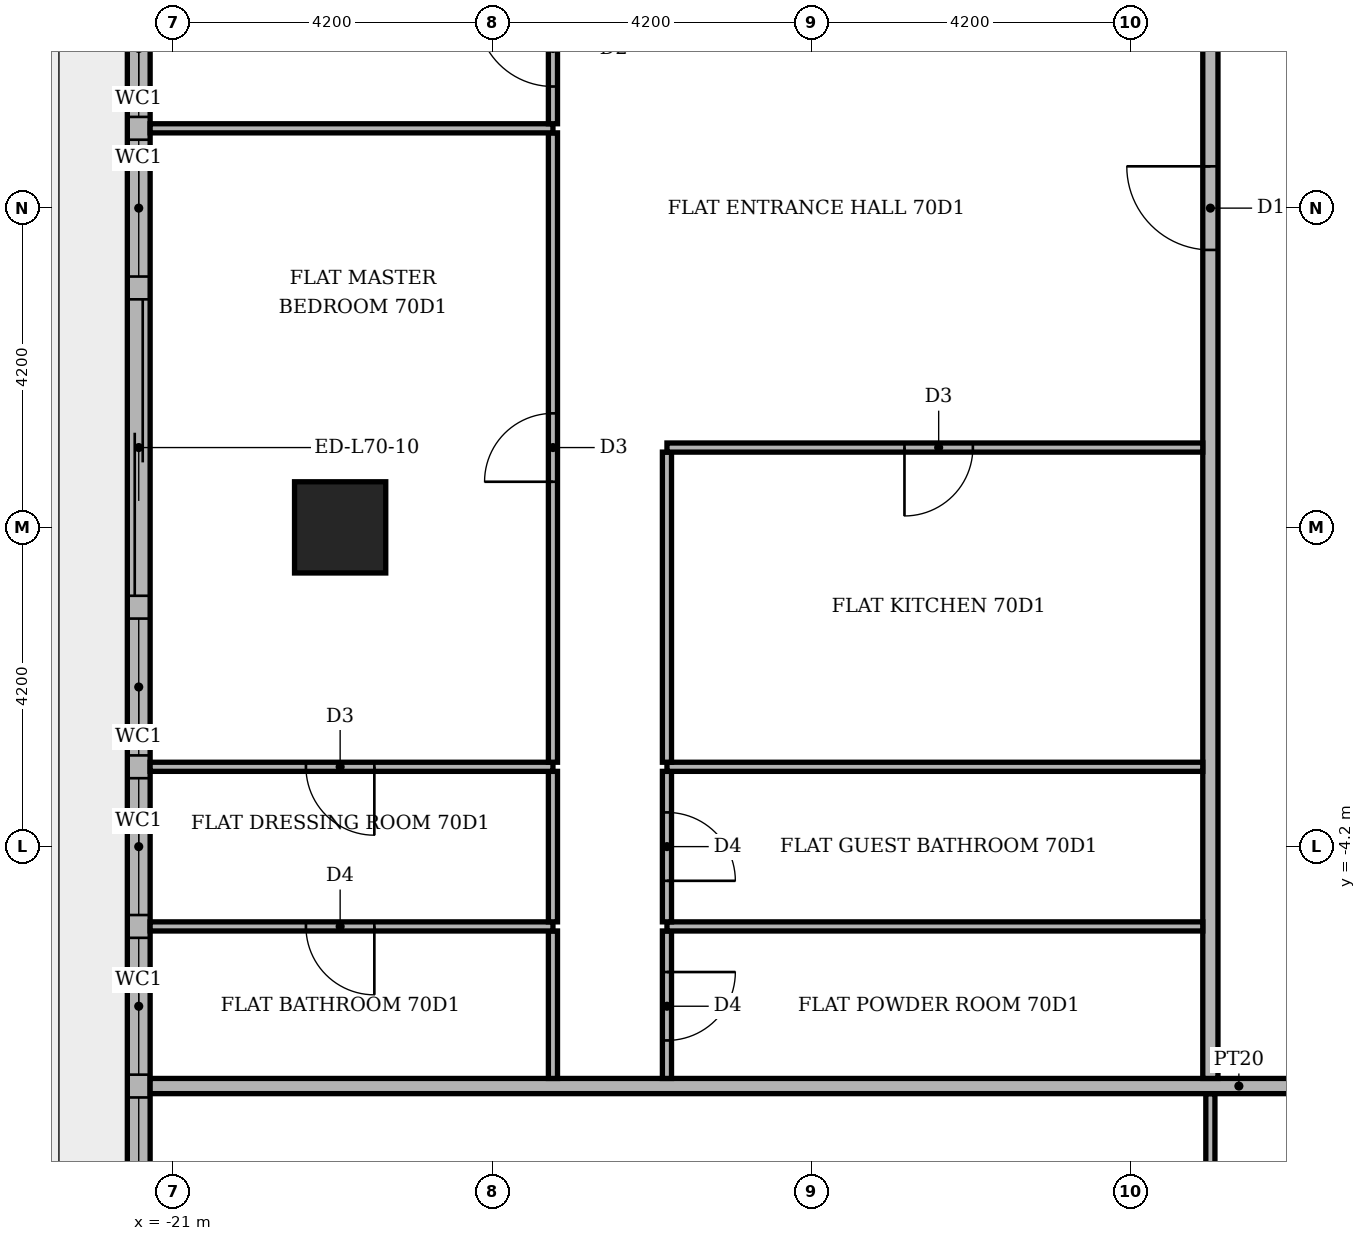
"""IFC4 building model, lengths in metres.
Left out: names, types, materials, properties, quantities, classifications, styles, units other than length and angle.
Written with IfcOpenShell. Run it as: python <this file> out.ifc"""

import sys

from ifc_helpers import new_model, si_unit, direction, frame, frame_2d, origin, origin_2d, place, context, subcontext, project, spatial, rectangle, extrude, element, fill, save


model = new_model("IFC4")
c1 = context("Model", 3, precision=1e-05, world=origin(), true_north=direction((0.0, 1.0)))
c2 = subcontext(c1, "Body", "Model", "MODEL_VIEW")
j1 = project(units=[si_unit("LENGTHUNIT", "METRE"), si_unit("PLANEANGLEUNIT", "RADIAN")], contexts=[c1])
p1 = place(None, origin())
s1 = spatial("IfcSite", under=j1, at=p1, CompositionType="ELEMENT")
p2 = place(p1, origin())
s2 = spatial("IfcBuilding", under=s1, at=p2, CompositionType="ELEMENT")
p3 = place(p2, frame((0.0, 0.0, 292.8)))
s3 = spatial("IfcBuildingStorey", under=s2, at=p3, CompositionType="ELEMENT", Elevation=292.8)
p4 = place(p3, frame((-18.8, 0.0, -0.35), z_axis=(0.0, 0.0, 1.0), x_axis=(1.0, 0.0, 0.0)))
e1 = element("IfcColumn", 1, at=p4, inside=s3, PredefinedType="COLUMN", context=c2, shape_type="SweptSolid", body=[
    extrude(rectangle(XDim=1.2, YDim=1.2, at=origin_2d()), origin(), (0.0, 0.0, 1.0), 4.25),
])
p5 = place(p3, frame((-21.45, 15.8, 0.0), z_axis=(0.0, 0.0, 1.0), x_axis=(0.0, -1.0, 0.0)))
e2 = element("IfcWall", 2, at=p5, inside=s3, PredefinedType="STANDARD", context=c2, shape_type="SweptSolid", body=[
    extrude(rectangle(XDim=31.9, YDim=0.3, at=frame_2d((15.95, 0.0))), origin(), (0.0, 0.0, 1.0), 3.55),
])
p6 = place(p5, frame((0.2, 0.0, 0.6)))
e3 = element("IfcOpeningElement", 3, at=p6, cuts=e2, PredefinedType="OPENING", context=c2, shape_type="SweptSolid", body=[
    extrude(rectangle(XDim=3.9, YDim=2.4, at=frame_2d((1.95, 1.2))), frame((0.0, 0.16, 0.0), z_axis=(0.0, -1.0, 0.0), x_axis=(1.0, 0.0, 0.0)), (0.0, 0.0, 1.0), 0.32),
])
p7 = place(p5, frame((4.4, 0.0, 0.0)))
e4 = element("IfcOpeningElement", 4, at=p7, cuts=e2, PredefinedType="OPENING", context=c2, shape_type="SweptSolid", body=[
    extrude(rectangle(XDim=3.9, YDim=2.4, at=frame_2d((1.95, 1.2))), frame((0.0, 0.16, 0.0), z_axis=(0.0, -1.0, 0.0), x_axis=(1.0, 0.0, 0.0)), (0.0, 0.0, 1.0), 0.32),
])
p8 = place(p5, frame((8.6, 0.0, 0.6)))
e5 = element("IfcOpeningElement", 5, at=p8, cuts=e2, PredefinedType="OPENING", context=c2, shape_type="SweptSolid", body=[
    extrude(rectangle(XDim=1.8, YDim=2.4, at=frame_2d((0.9, 1.2))), frame((0.0, 0.16, 0.0), z_axis=(0.0, -1.0, 0.0), x_axis=(1.0, 0.0, 0.0)), (0.0, 0.0, 1.0), 0.32),
])
p9 = place(p5, frame((10.7, 0.0, 0.6)))
e6 = element("IfcOpeningElement", 6, at=p9, cuts=e2, PredefinedType="OPENING", context=c2, shape_type="SweptSolid", body=[
    extrude(rectangle(XDim=1.8, YDim=2.4, at=frame_2d((0.9, 1.2))), frame((0.0, 0.16, 0.0), z_axis=(0.0, -1.0, 0.0), x_axis=(1.0, 0.0, 0.0)), (0.0, 0.0, 1.0), 0.32),
])
p10 = place(p5, frame((12.8, 0.0, 0.0)))
e7 = element("IfcOpeningElement", 7, at=p10, cuts=e2, PredefinedType="OPENING", context=c2, shape_type="SweptSolid", body=[
    extrude(rectangle(XDim=3.9, YDim=2.4, at=frame_2d((1.95, 1.2))), frame((0.0, 0.16, 0.0), z_axis=(0.0, -1.0, 0.0), x_axis=(1.0, 0.0, 0.0)), (0.0, 0.0, 1.0), 0.32),
])
p11 = place(p5, frame((17.0, 0.0, 0.6)))
e8 = element("IfcOpeningElement", 8, at=p11, cuts=e2, PredefinedType="OPENING", context=c2, shape_type="SweptSolid", body=[
    extrude(rectangle(XDim=1.8, YDim=2.4, at=frame_2d((0.9, 1.2))), frame((0.0, 0.16, 0.0), z_axis=(0.0, -1.0, 0.0), x_axis=(1.0, 0.0, 0.0)), (0.0, 0.0, 1.0), 0.32),
])
p12 = place(p5, frame((19.1, 0.0, 0.6)))
e9 = element("IfcOpeningElement", 9, at=p12, cuts=e2, PredefinedType="OPENING", context=c2, shape_type="SweptSolid", body=[
    extrude(rectangle(XDim=1.8, YDim=2.4, at=frame_2d((0.9, 1.2))), frame((0.0, 0.16, 0.0), z_axis=(0.0, -1.0, 0.0), x_axis=(1.0, 0.0, 0.0)), (0.0, 0.0, 1.0), 0.32),
])
p13 = place(p5, frame((21.2, 0.0, 0.6)))
e10 = element("IfcOpeningElement", 10, at=p13, cuts=e2, PredefinedType="OPENING", context=c2, shape_type="SweptSolid", body=[
    extrude(rectangle(XDim=1.8, YDim=2.4, at=frame_2d((0.9, 1.2))), frame((0.0, 0.16, 0.0), z_axis=(0.0, -1.0, 0.0), x_axis=(1.0, 0.0, 0.0)), (0.0, 0.0, 1.0), 0.32),
])
p14 = place(p5, frame((23.3, 0.0, 0.6)))
e11 = element("IfcOpeningElement", 11, at=p14, cuts=e2, PredefinedType="OPENING", context=c2, shape_type="SweptSolid", body=[
    extrude(rectangle(XDim=6.0, YDim=2.4, at=frame_2d((3.0, 1.2))), frame((0.0, 0.16, 0.0), z_axis=(0.0, -1.0, 0.0), x_axis=(1.0, 0.0, 0.0)), (0.0, 0.0, 1.0), 0.32),
])
p15 = place(p5, frame((29.6, 0.0, 0.6)))
e12 = element("IfcOpeningElement", 12, at=p15, cuts=e2, PredefinedType="OPENING", context=c2, shape_type="SweptSolid", body=[
    extrude(rectangle(XDim=1.8, YDim=2.4, at=frame_2d((0.9, 1.2))), frame((0.0, 0.16, 0.0), z_axis=(0.0, -1.0, 0.0), x_axis=(1.0, 0.0, 0.0)), (0.0, 0.0, 1.0), 0.32),
])
p16 = place(p3, frame((-7.35, -16.24, 0.0), z_axis=(0.0, 0.0, 1.0), x_axis=(0.0, 1.0, 0.0)))
e13 = element("IfcWall", 13, at=p16, inside=s3, PredefinedType="PARTITIONING", context=c2, shape_type="SweptSolid", body=[
    extrude(rectangle(XDim=8.79, YDim=0.12, at=frame_2d((4.395, 0.0))), origin(), (0.0, 0.0, 1.0), 3.55),
])
p17 = place(p16, frame((3.965, 0.0, 0.0)))
e14 = element("IfcOpeningElement", 14, at=p17, cuts=e13, PredefinedType="OPENING", context=c2, shape_type="SweptSolid", body=[
    extrude(rectangle(XDim=0.9, YDim=2.1, at=frame_2d((0.45, 1.05))), frame((0.0, 0.07, 0.0), z_axis=(0.0, -1.0, 0.0), x_axis=(1.0, 0.0, 0.0)), (0.0, 0.0, 1.0), 0.14),
])
p18 = place(p3, frame((-21.3, -7.35, 0.0), z_axis=(0.0, 0.0, 1.0), x_axis=(1.0, 0.0, 0.0)))
e15 = element("IfcWall", 15, at=p18, inside=s3, PredefinedType="PARTITIONING", context=c2, shape_type="SweptSolid", body=[
    extrude(rectangle(XDim=28.65, YDim=0.2, at=frame_2d((14.325, 0.0))), origin(), (0.0, 0.0, 1.0), 3.55),
])
p19 = place(p18, frame((16.55, 0.0, 0.0)))
e16 = element("IfcOpeningElement", 16, at=p19, cuts=e15, PredefinedType="OPENING", context=c2, shape_type="SweptSolid", body=[
    extrude(rectangle(XDim=1.1, YDim=2.4, at=frame_2d((0.55, 1.2))), frame((0.0, 0.11, 0.0), z_axis=(0.0, -1.0, 0.0), x_axis=(1.0, 0.0, 0.0)), (0.0, 0.0, 1.0), 0.22),
])
p20 = place(p3, frame((-16.0, -7.25, 0.0), z_axis=(0.0, 0.0, 1.0), x_axis=(0.0, 1.0, 0.0)))
e17 = element("IfcWall", 17, at=p20, inside=s3, PredefinedType="PARTITIONING", context=c2, shape_type="SweptSolid", body=[
    extrude(rectangle(XDim=1.94, YDim=0.12, at=frame_2d((0.97, 0.0))), origin(), (0.0, 0.0, 1.0), 3.55),
])
p21 = place(p3, frame((-14.5, -7.25, 0.0), z_axis=(0.0, 0.0, 1.0), x_axis=(0.0, 1.0, 0.0)))
e18 = element("IfcWall", 18, at=p21, inside=s3, PredefinedType="PARTITIONING", context=c2, shape_type="SweptSolid", body=[
    extrude(rectangle(XDim=1.94, YDim=0.12, at=frame_2d((0.97, 0.0))), origin(), (0.0, 0.0, 1.0), 3.55),
])
p22 = place(p21, frame((0.5, 0.0, 0.0)))
e19 = element("IfcOpeningElement", 19, at=p22, cuts=e18, PredefinedType="OPENING", context=c2, shape_type="SweptSolid", body=[
    extrude(rectangle(XDim=0.9, YDim=2.1, at=frame_2d((0.45, 1.05))), frame((0.0, 0.07, 0.0), z_axis=(0.0, -1.0, 0.0), x_axis=(1.0, 0.0, 0.0)), (0.0, 0.0, 1.0), 0.14),
])
p23 = place(p3, frame((-7.35, -7.25, 0.0), z_axis=(0.0, 0.0, 1.0), x_axis=(0.0, 1.0, 0.0)))
e20 = element("IfcWall", 20, at=p23, inside=s3, PredefinedType="PARTITIONING", context=c2, shape_type="SweptSolid", body=[
    extrude(rectangle(XDim=14.5, YDim=0.2, at=frame_2d((7.25, 0.0))), origin(), (0.0, 0.0, 1.0), 3.55),
])
p24 = place(p23, frame((10.9, 0.0, 0.0)))
e21 = element("IfcOpeningElement", 21, at=p24, cuts=e20, PredefinedType="OPENING", context=c2, shape_type="SweptSolid", body=[
    extrude(rectangle(XDim=1.1, YDim=2.4, at=frame_2d((0.55, 1.2))), frame((0.0, 0.11, 0.0), z_axis=(0.0, -1.0, 0.0), x_axis=(1.0, 0.0, 0.0)), (0.0, 0.0, 1.0), 0.22),
])
p25 = place(p3, frame((-21.3, -5.25, 0.0), z_axis=(0.0, 0.0, 1.0), x_axis=(1.0, 0.0, 0.0)))
e22 = element("IfcWall", 22, at=p25, inside=s3, PredefinedType="PARTITIONING", context=c2, shape_type="SweptSolid", body=[
    extrude(rectangle(XDim=5.3, YDim=0.12, at=frame_2d((2.65, 0.0))), origin(), (0.0, 0.0, 1.0), 3.55),
])
p26 = place(p25, frame((2.05, 0.0, 0.0)))
e23 = element("IfcOpeningElement", 23, at=p26, cuts=e22, PredefinedType="OPENING", context=c2, shape_type="SweptSolid", body=[
    extrude(rectangle(XDim=0.9, YDim=2.1, at=frame_2d((0.45, 1.05))), frame((0.0, 0.07, 0.0), z_axis=(0.0, -1.0, 0.0), x_axis=(1.0, 0.0, 0.0)), (0.0, 0.0, 1.0), 0.14),
])
p27 = place(p3, frame((-14.5, -5.25, 0.0), z_axis=(0.0, 0.0, 1.0), x_axis=(1.0, 0.0, 0.0)))
e24 = element("IfcWall", 24, at=p27, inside=s3, PredefinedType="PARTITIONING", context=c2, shape_type="SweptSolid", body=[
    extrude(rectangle(XDim=7.05, YDim=0.12, at=frame_2d((3.525, 0.0))), origin(), (0.0, 0.0, 1.0), 3.55),
])
p28 = place(p3, frame((-16.0, -5.19, 0.0), z_axis=(0.0, 0.0, 1.0), x_axis=(0.0, 1.0, 0.0)))
e25 = element("IfcWall", 25, at=p28, inside=s3, PredefinedType="PARTITIONING", context=c2, shape_type="SweptSolid", body=[
    extrude(rectangle(XDim=1.98, YDim=0.12, at=frame_2d((0.99, 0.0))), origin(), (0.0, 0.0, 1.0), 3.55),
])
p29 = place(p3, frame((-14.5, -5.19, 0.0), z_axis=(0.0, 0.0, 1.0), x_axis=(0.0, 1.0, 0.0)))
e26 = element("IfcWall", 26, at=p29, inside=s3, PredefinedType="PARTITIONING", context=c2, shape_type="SweptSolid", body=[
    extrude(rectangle(XDim=1.98, YDim=0.12, at=frame_2d((0.99, 0.0))), origin(), (0.0, 0.0, 1.0), 3.55),
])
p30 = place(p29, frame((0.54, 0.0, 0.0)))
e27 = element("IfcOpeningElement", 27, at=p30, cuts=e26, PredefinedType="OPENING", context=c2, shape_type="SweptSolid", body=[
    extrude(rectangle(XDim=0.9, YDim=2.1, at=frame_2d((0.45, 1.05))), frame((0.0, 0.07, 0.0), z_axis=(0.0, -1.0, 0.0), x_axis=(1.0, 0.0, 0.0)), (0.0, 0.0, 1.0), 0.14),
])
p31 = place(p3, frame((-21.3, -3.15, 0.0), z_axis=(0.0, 0.0, 1.0), x_axis=(1.0, 0.0, 0.0)))
e28 = element("IfcWall", 28, at=p31, inside=s3, PredefinedType="PARTITIONING", context=c2, shape_type="SweptSolid", body=[
    extrude(rectangle(XDim=5.3, YDim=0.12, at=frame_2d((2.65, 0.0))), origin(), (0.0, 0.0, 1.0), 3.55),
])
p32 = place(p31, frame((2.05, 0.0, 0.0)))
e29 = element("IfcOpeningElement", 29, at=p32, cuts=e28, PredefinedType="OPENING", context=c2, shape_type="SweptSolid", body=[
    extrude(rectangle(XDim=0.9, YDim=2.1, at=frame_2d((0.45, 1.05))), frame((0.0, 0.07, 0.0), z_axis=(0.0, -1.0, 0.0), x_axis=(1.0, 0.0, 0.0)), (0.0, 0.0, 1.0), 0.14),
])
p33 = place(p3, frame((-14.5, -3.15, 0.0), z_axis=(0.0, 0.0, 1.0), x_axis=(1.0, 0.0, 0.0)))
e30 = element("IfcWall", 30, at=p33, inside=s3, PredefinedType="PARTITIONING", context=c2, shape_type="SweptSolid", body=[
    extrude(rectangle(XDim=7.05, YDim=0.12, at=frame_2d((3.525, 0.0))), origin(), (0.0, 0.0, 1.0), 3.55),
])
p34 = place(p3, frame((-16.0, -3.09, 0.0), z_axis=(0.0, 0.0, 1.0), x_axis=(0.0, 1.0, 0.0)))
e31 = element("IfcWall", 31, at=p34, inside=s3, PredefinedType="PARTITIONING", context=c2, shape_type="SweptSolid", body=[
    extrude(rectangle(XDim=8.28, YDim=0.12, at=frame_2d((4.14, 0.0))), origin(), (0.0, 0.0, 1.0), 3.55),
])
p35 = place(p34, frame((3.69, 0.0, 0.0)))
e32 = element("IfcOpeningElement", 32, at=p35, cuts=e31, PredefinedType="OPENING", context=c2, shape_type="SweptSolid", body=[
    extrude(rectangle(XDim=0.9, YDim=2.1, at=frame_2d((0.45, 1.05))), frame((0.0, 0.07, 0.0), z_axis=(0.0, -1.0, 0.0), x_axis=(1.0, 0.0, 0.0)), (0.0, 0.0, 1.0), 0.14),
])
p36 = place(p3, frame((-14.5, -3.09, 0.0), z_axis=(0.0, 0.0, 1.0), x_axis=(0.0, 1.0, 0.0)))
e33 = element("IfcWall", 33, at=p36, inside=s3, PredefinedType="PARTITIONING", context=c2, shape_type="SweptSolid", body=[
    extrude(rectangle(XDim=4.08, YDim=0.12, at=frame_2d((2.04, 0.0))), origin(), (0.0, 0.0, 1.0), 3.55),
])
p37 = place(p3, frame((-14.5, 1.05, 0.0), z_axis=(0.0, 0.0, 1.0), x_axis=(1.0, 0.0, 0.0)))
e34 = element("IfcWall", 34, at=p37, inside=s3, PredefinedType="PARTITIONING", context=c2, shape_type="SweptSolid", body=[
    extrude(rectangle(XDim=7.05, YDim=0.12, at=frame_2d((3.525, 0.0))), origin(), (0.0, 0.0, 1.0), 3.55),
])
p38 = place(p37, frame((3.125, 0.0, 0.0)))
e35 = element("IfcOpeningElement", 35, at=p38, cuts=e34, PredefinedType="OPENING", context=c2, shape_type="SweptSolid", body=[
    extrude(rectangle(XDim=0.9, YDim=2.1, at=frame_2d((0.45, 1.05))), frame((0.0, 0.07, 0.0), z_axis=(0.0, -1.0, 0.0), x_axis=(1.0, 0.0, 0.0)), (0.0, 0.0, 1.0), 0.14),
])
p39 = place(p3, frame((-21.3, 5.25, 0.0), z_axis=(0.0, 0.0, 1.0), x_axis=(1.0, 0.0, 0.0)))
e36 = element("IfcWall", 36, at=p39, inside=s3, PredefinedType="PARTITIONING", context=c2, shape_type="SweptSolid", body=[
    extrude(rectangle(XDim=5.3, YDim=0.12, at=frame_2d((2.65, 0.0))), origin(), (0.0, 0.0, 1.0), 3.55),
])
p40 = place(p3, frame((-16.0, 5.31, 0.0), z_axis=(0.0, 0.0, 1.0), x_axis=(0.0, 1.0, 0.0)))
e37 = element("IfcWall", 37, at=p40, inside=s3, PredefinedType="PARTITIONING", context=c2, shape_type="SweptSolid", body=[
    extrude(rectangle(XDim=1.98, YDim=0.12, at=frame_2d((0.99, 0.0))), origin(), (0.0, 0.0, 1.0), 3.55),
])
p41 = place(p40, frame((0.49, 0.0, 0.0)))
e38 = element("IfcOpeningElement", 38, at=p41, cuts=e37, PredefinedType="OPENING", context=c2, shape_type="SweptSolid", body=[
    extrude(rectangle(XDim=1.0, YDim=2.1, at=frame_2d((0.5, 1.05))), frame((0.0, 0.07, 0.0), z_axis=(0.0, -1.0, 0.0), x_axis=(1.0, 0.0, 0.0)), (0.0, 0.0, 1.0), 0.14),
])
p42 = place(p8, origin())
e39 = element("IfcWindow", 39, at=p42, inside=s3, PartitioningType="SINGLE_PANEL", PredefinedType="WINDOW", context=c2, shape_type="SweptSolid", body=[
    extrude(rectangle(XDim=1.8, YDim=2.4, at=frame_2d((0.9, 1.2))), frame((0.0, 0.03, 0.0), z_axis=(0.0, -1.0, 0.0), x_axis=(1.0, 0.0, 0.0)), (0.0, 0.0, 1.0), 0.06),
])
fill(e5, e39)
p43 = place(p9, origin())
e40 = element("IfcWindow", 40, at=p43, inside=s3, PartitioningType="SINGLE_PANEL", PredefinedType="WINDOW", context=c2, shape_type="SweptSolid", body=[
    extrude(rectangle(XDim=1.8, YDim=2.4, at=frame_2d((0.9, 1.2))), frame((0.0, 0.03, 0.0), z_axis=(0.0, -1.0, 0.0), x_axis=(1.0, 0.0, 0.0)), (0.0, 0.0, 1.0), 0.06),
])
fill(e6, e40)
p44 = place(p10, origin())
e41 = element("IfcDoor", 41, at=p44, inside=s3, OperationType="SLIDING_TO_RIGHT", PredefinedType="DOOR", context=c2, shape_type="SweptSolid", body=[
    extrude(rectangle(XDim=3.9, YDim=2.4, at=frame_2d((1.95, 1.2))), frame((0.0, 0.025, 0.0), z_axis=(0.0, -1.0, 0.0), x_axis=(1.0, 0.0, 0.0)), (0.0, 0.0, 1.0), 0.05),
])
fill(e7, e41)
p45 = place(p11, origin())
e42 = element("IfcWindow", 42, at=p45, inside=s3, PartitioningType="SINGLE_PANEL", PredefinedType="WINDOW", context=c2, shape_type="SweptSolid", body=[
    extrude(rectangle(XDim=1.8, YDim=2.4, at=frame_2d((0.9, 1.2))), frame((0.0, 0.03, 0.0), z_axis=(0.0, -1.0, 0.0), x_axis=(1.0, 0.0, 0.0)), (0.0, 0.0, 1.0), 0.06),
])
fill(e8, e42)
p46 = place(p12, origin())
e43 = element("IfcWindow", 43, at=p46, inside=s3, PartitioningType="SINGLE_PANEL", PredefinedType="WINDOW", context=c2, shape_type="SweptSolid", body=[
    extrude(rectangle(XDim=1.8, YDim=2.4, at=frame_2d((0.9, 1.2))), frame((0.0, 0.03, 0.0), z_axis=(0.0, -1.0, 0.0), x_axis=(1.0, 0.0, 0.0)), (0.0, 0.0, 1.0), 0.06),
])
fill(e9, e43)
p47 = place(p13, origin())
e44 = element("IfcWindow", 44, at=p47, inside=s3, PartitioningType="SINGLE_PANEL", PredefinedType="WINDOW", context=c2, shape_type="SweptSolid", body=[
    extrude(rectangle(XDim=1.8, YDim=2.4, at=frame_2d((0.9, 1.2))), frame((0.0, 0.03, 0.0), z_axis=(0.0, -1.0, 0.0), x_axis=(1.0, 0.0, 0.0)), (0.0, 0.0, 1.0), 0.06),
])
fill(e10, e44)
p48 = place(p14, origin())
e45 = element("IfcWindow", 45, at=p48, inside=s3, PartitioningType="SINGLE_PANEL", PredefinedType="WINDOW", context=c2, shape_type="SweptSolid", body=[
    extrude(rectangle(XDim=6.0, YDim=2.4, at=frame_2d((3.0, 1.2))), frame((0.0, 0.03, 0.0), z_axis=(0.0, -1.0, 0.0), x_axis=(1.0, 0.0, 0.0)), (0.0, 0.0, 1.0), 0.06),
])
fill(e11, e45)
p49 = place(p24, origin())
e46 = element("IfcDoor", 46, at=p49, inside=s3, OperationType="SINGLE_SWING_RIGHT", PredefinedType="DOOR", context=c2, shape_type="SweptSolid", body=[
    extrude(rectangle(XDim=1.1, YDim=2.4, at=frame_2d((0.55, 1.2))), frame((0.0, 0.025, 0.0), z_axis=(0.0, -1.0, 0.0), x_axis=(1.0, 0.0, 0.0)), (0.0, 0.0, 1.0), 0.05),
])
fill(e21, e46)
p50 = place(p38, frame((0.9, 0.0, 0.0), z_axis=(0.0, 0.0, 1.0), x_axis=(-1.0, 0.0, 0.0)))
e47 = element("IfcDoor", 47, at=p50, inside=s3, OperationType="SINGLE_SWING_LEFT", PredefinedType="DOOR", context=c2, shape_type="SweptSolid", body=[
    extrude(rectangle(XDim=0.9, YDim=2.1, at=frame_2d((0.45, 1.05))), frame((0.0, 0.025, 0.0), z_axis=(0.0, -1.0, 0.0), x_axis=(1.0, 0.0, 0.0)), (0.0, 0.0, 1.0), 0.05),
])
fill(e35, e47)
p51 = place(p30, frame((0.9, 0.0, 0.0), z_axis=(0.0, 0.0, 1.0), x_axis=(-1.0, 0.0, 0.0)))
e48 = element("IfcDoor", 48, at=p51, inside=s3, OperationType="SINGLE_SWING_LEFT", PredefinedType="DOOR", context=c2, shape_type="SweptSolid", body=[
    extrude(rectangle(XDim=0.9, YDim=2.1, at=frame_2d((0.45, 1.05))), frame((0.0, 0.025, 0.0), z_axis=(0.0, -1.0, 0.0), x_axis=(1.0, 0.0, 0.0)), (0.0, 0.0, 1.0), 0.05),
])
fill(e27, e48)
p52 = place(p22, frame((0.9, 0.0, 0.0), z_axis=(0.0, 0.0, 1.0), x_axis=(-1.0, 0.0, 0.0)))
e49 = element("IfcDoor", 49, at=p52, inside=s3, OperationType="SINGLE_SWING_RIGHT", PredefinedType="DOOR", context=c2, shape_type="SweptSolid", body=[
    extrude(rectangle(XDim=0.9, YDim=2.1, at=frame_2d((0.45, 1.05))), frame((0.0, 0.025, 0.0), z_axis=(0.0, -1.0, 0.0), x_axis=(1.0, 0.0, 0.0)), (0.0, 0.0, 1.0), 0.05),
])
fill(e19, e49)
p53 = place(p41, origin())
e50 = element("IfcDoor", 50, at=p53, inside=s3, OperationType="SINGLE_SWING_RIGHT", PredefinedType="DOOR", context=c2, shape_type="SweptSolid", body=[
    extrude(rectangle(XDim=1.0, YDim=2.1, at=frame_2d((0.5, 1.05))), frame((0.0, 0.025, 0.0), z_axis=(0.0, -1.0, 0.0), x_axis=(1.0, 0.0, 0.0)), (0.0, 0.0, 1.0), 0.05),
])
fill(e38, e50)
p54 = place(p35, origin())
e51 = element("IfcDoor", 51, at=p54, inside=s3, OperationType="SINGLE_SWING_LEFT", PredefinedType="DOOR", context=c2, shape_type="SweptSolid", body=[
    extrude(rectangle(XDim=0.9, YDim=2.1, at=frame_2d((0.45, 1.05))), frame((0.0, 0.025, 0.0), z_axis=(0.0, -1.0, 0.0), x_axis=(1.0, 0.0, 0.0)), (0.0, 0.0, 1.0), 0.05),
])
fill(e32, e51)
p55 = place(p32, frame((0.9, 0.0, 0.0), z_axis=(0.0, 0.0, 1.0), x_axis=(-1.0, 0.0, 0.0)))
e52 = element("IfcDoor", 52, at=p55, inside=s3, OperationType="SINGLE_SWING_RIGHT", PredefinedType="DOOR", context=c2, shape_type="SweptSolid", body=[
    extrude(rectangle(XDim=0.9, YDim=2.1, at=frame_2d((0.45, 1.05))), frame((0.0, 0.025, 0.0), z_axis=(0.0, -1.0, 0.0), x_axis=(1.0, 0.0, 0.0)), (0.0, 0.0, 1.0), 0.05),
])
fill(e29, e52)
p56 = place(p26, frame((0.9, 0.0, 0.0), z_axis=(0.0, 0.0, 1.0), x_axis=(-1.0, 0.0, 0.0)))
e53 = element("IfcDoor", 53, at=p56, inside=s3, OperationType="SINGLE_SWING_RIGHT", PredefinedType="DOOR", context=c2, shape_type="SweptSolid", body=[
    extrude(rectangle(XDim=0.9, YDim=2.1, at=frame_2d((0.45, 1.05))), frame((0.0, 0.025, 0.0), z_axis=(0.0, -1.0, 0.0), x_axis=(1.0, 0.0, 0.0)), (0.0, 0.0, 1.0), 0.05),
])
fill(e23, e53)
save(model, sys.argv[1])
